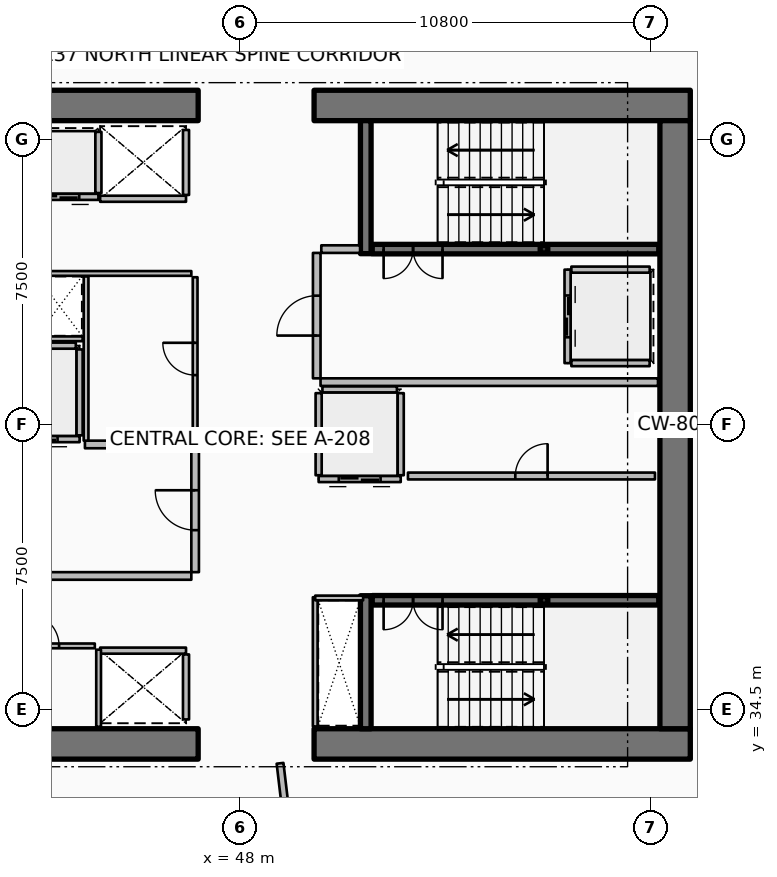
"""IFC4 building model, lengths in metres.
Left out: names, types, materials, properties, quantities, classifications, styles, units other than length and angle.
Written with IfcOpenShell. Run it as: python <this file> out.ifc"""

import sys

from ifc_helpers import new_model, si_unit, direction, frame, frame_2d, origin, origin_2d, place, context, subcontext, project, spatial, rectangle, hollow_rectangle, extrude, element, fill, save


model = new_model("IFC4")
c1 = context("Model", 3, precision=1e-05, world=origin(), true_north=direction((0.0, 1.0)))
c2 = subcontext(c1, "Body", "Model", "MODEL_VIEW")
j1 = project(units=[si_unit("LENGTHUNIT", "METRE"), si_unit("PLANEANGLEUNIT", "RADIAN")], contexts=[c1])
p1 = place(None, origin())
s1 = spatial("IfcSite", under=j1, at=p1, CompositionType="ELEMENT")
p2 = place(p1, origin())
s2 = spatial("IfcBuilding", under=s1, at=p2, CompositionType="ELEMENT")
p3 = place(p2, frame((0.0, 0.0, 150.3)))
s3 = spatial("IfcBuildingStorey", under=s2, at=p3, CompositionType="ELEMENT", Elevation=150.3)
p4 = place(p3, frame((37.0, 33.6, 0.0), z_axis=(0.0, 0.0, 1.0), x_axis=(1.0, 0.0, 0.0)))
e1 = element("IfcWall", 1, at=p4, inside=s3, PredefinedType="SHEAR", context=c2, shape_type="SweptSolid", body=[
    extrude(rectangle(XDim=9.9, YDim=0.8, at=frame_2d((4.95, 0.0))), origin(), (0.0, 0.0, 1.0), 3.75),
])
p5 = place(p3, frame((49.95, 33.6, 0.0), z_axis=(0.0, 0.0, 1.0), x_axis=(1.0, 0.0, 0.0)))
e2 = element("IfcWall", 2, at=p5, inside=s3, PredefinedType="SHEAR", context=c2, shape_type="SweptSolid", body=[
    extrude(rectangle(XDim=9.9, YDim=0.8, at=frame_2d((4.95, 0.0))), origin(), (0.0, 0.0, 1.0), 3.75),
])
p6 = place(p3, frame((37.0, 50.4, 0.0), z_axis=(0.0, 0.0, 1.0), x_axis=(1.0, 0.0, 0.0)))
e3 = element("IfcWall", 3, at=p6, inside=s3, PredefinedType="SHEAR", context=c2, shape_type="SweptSolid", body=[
    extrude(rectangle(XDim=9.9, YDim=0.8, at=frame_2d((4.95, 0.0))), origin(), (0.0, 0.0, 1.0), 3.75),
])
p7 = place(p3, frame((49.95, 50.4, 0.0), z_axis=(0.0, 0.0, 1.0), x_axis=(1.0, 0.0, 0.0)))
e4 = element("IfcWall", 4, at=p7, inside=s3, PredefinedType="SHEAR", context=c2, shape_type="SweptSolid", body=[
    extrude(rectangle(XDim=9.9, YDim=0.8, at=frame_2d((4.95, 0.0))), origin(), (0.0, 0.0, 1.0), 3.75),
])
p8 = place(p3, frame((59.45, 34.0, 0.0), z_axis=(0.0, 0.0, 1.0), x_axis=(0.0, 1.0, 0.0)))
e5 = element("IfcWall", 5, at=p8, inside=s3, PredefinedType="SHEAR", context=c2, shape_type="SweptSolid", body=[
    extrude(rectangle(XDim=16.0, YDim=0.8, at=frame_2d((8.0, 0.0))), origin(), (0.0, 0.0, 1.0), 3.75),
])
for number, where, z_axis, x_axis in (
    (6, (51.31, 46.5, 0.0), (0.0, 0.0, 1.0), (0.0, 1.0, 0.0)),
    (7, (51.31, 34.0, 0.0), (0.0, 0.0, 1.0), (0.0, 1.0, 0.0)),
):
    element("IfcWall", number, at=place(p3, frame(where, z_axis=z_axis, x_axis=x_axis)), inside=s3, PredefinedType="SHEAR", context=c2, shape_type="SweptSolid", body=[
        extrude(rectangle(XDim=3.5, YDim=0.28, at=frame_2d((1.75, 0.0))), origin(), (0.0, 0.0, 1.0), 3.75),
    ])
for number, where, z_axis, x_axis in (
    (8, (56.0, 46.62, 0.0), (0.0, 0.0, 1.0), (1.0, 0.0, 0.0)),
    (9, (56.0, 37.38, 0.0), (0.0, 0.0, 1.0), (1.0, 0.0, 0.0)),
):
    element("IfcColumn", number, at=place(p3, frame(where, z_axis=z_axis, x_axis=x_axis)), inside=s3, PredefinedType="COLUMN", context=c2, shape_type="SweptSolid", body=[
        extrude(hollow_rectangle(XDim=0.2, YDim=0.2, WallThickness=0.01, InnerFilletRadius=0.01, OuterFilletRadius=0.02, at=origin_2d()), origin(), (0.0, 0.0, 1.0), 1.67),
    ])
p9 = place(p3, frame((51.48, 46.62, 0.0), z_axis=(0.0, 0.0, 1.0), x_axis=(1.0, 0.0, 0.0)))
e10 = element("IfcWall", 10, at=p9, inside=s3, PredefinedType="SOLIDWALL", context=c2, shape_type="SweptSolid", body=[
    extrude(rectangle(XDim=7.54, YDim=0.25, at=frame_2d((3.77, 0.0))), origin(), (0.0, 0.0, 1.0), 3.5),
])
p10 = place(p9, frame((0.3, 0.0, 0.0)))
e11 = element("IfcOpeningElement", 11, at=p10, cuts=e10, PredefinedType="OPENING", context=c2, shape_type="SweptSolid", body=[
    extrude(rectangle(XDim=1.55, YDim=2.15, at=frame_2d((0.775, 1.075))), frame((0.0, 0.135, 0.0), z_axis=(0.0, -1.0, 0.0), x_axis=(1.0, 0.0, 0.0)), (0.0, 0.0, 1.0), 0.27),
])
p11 = place(p3, frame((51.48, 37.38, 0.0), z_axis=(0.0, 0.0, 1.0), x_axis=(1.0, 0.0, 0.0)))
e12 = element("IfcWall", 12, at=p11, inside=s3, PredefinedType="SOLIDWALL", context=c2, shape_type="SweptSolid", body=[
    extrude(rectangle(XDim=7.54, YDim=0.25, at=frame_2d((3.77, 0.0))), origin(), (0.0, 0.0, 1.0), 3.5),
])
p12 = place(p11, frame((0.3, 0.0, 0.0)))
e13 = element("IfcOpeningElement", 13, at=p12, cuts=e12, PredefinedType="OPENING", context=c2, shape_type="SweptSolid", body=[
    extrude(rectangle(XDim=1.55, YDim=2.15, at=frame_2d((0.775, 1.075))), frame((0.0, 0.135, 0.0), z_axis=(0.0, -1.0, 0.0), x_axis=(1.0, 0.0, 0.0)), (0.0, 0.0, 1.0), 0.27),
])
p13 = place(p3, frame((44.275, 47.995, 0.0), z_axis=(0.0, 0.0, 1.0), x_axis=(-1.0, 0.0, 0.0)))
e14 = element("IfcWall", 14, at=p13, inside=s3, PredefinedType="PARTITIONING", context=c2, shape_type="SweptSolid", body=[
    extrude(rectangle(XDim=2.11, YDim=0.16, at=frame_2d((1.055, 0.0))), origin(), (0.0, 0.0, 1.0), 3.5),
])
p14 = place(p13, frame((0.505, 0.0, 0.0)))
e15 = element("IfcOpeningElement", 15, at=p14, cuts=e14, PredefinedType="OPENING", context=c2, shape_type="SweptSolid", body=[
    extrude(rectangle(XDim=1.1, YDim=2.1, at=frame_2d((0.55, 1.05))), frame((0.0, 0.09, 0.0), z_axis=(0.0, -1.0, 0.0), x_axis=(1.0, 0.0, 0.0)), (0.0, 0.0, 1.0), 0.18),
])
p15 = place(p3, frame((44.275, 48.095, 0.0), z_axis=(0.0, 0.0, 1.0), x_axis=(0.0, 1.0, 0.0)))
e16 = element("IfcWall", 16, at=p15, inside=s3, PredefinedType="PARTITIONING", context=c2, shape_type="SweptSolid", body=[
    extrude(rectangle(XDim=1.61, YDim=0.16, at=frame_2d((0.805, 0.0))), origin(), (0.0, 0.0, 1.0), 3.5),
])
p16 = place(p3, frame((46.58, 47.945, 0.0), z_axis=(0.0, 0.0, 1.0), x_axis=(-1.0, 0.0, 0.0)))
e17 = element("IfcWall", 17, at=p16, inside=s3, PredefinedType="PARTITIONING", context=c2, shape_type="SweptSolid", body=[
    extrude(rectangle(XDim=2.26, YDim=0.16, at=frame_2d((1.13, 0.0))), origin(), (0.0, 0.0, 1.0), 3.5),
])
p17 = place(p3, frame((46.58, 48.045, 0.0), z_axis=(0.0, 0.0, 1.0), x_axis=(0.0, 1.0, 0.0)))
e18 = element("IfcWall", 18, at=p17, inside=s3, PredefinedType="PARTITIONING", context=c2, shape_type="SweptSolid", body=[
    extrude(rectangle(XDim=1.71, YDim=0.16, at=frame_2d((0.855, 0.0))), origin(), (0.0, 0.0, 1.0), 3.5),
])
p18 = place(p3, frame((44.32, 36.055, 0.0), z_axis=(0.0, 0.0, 1.0), x_axis=(1.0, 0.0, 0.0)))
e19 = element("IfcWall", 19, at=p18, inside=s3, PredefinedType="PARTITIONING", context=c2, shape_type="SweptSolid", body=[
    extrude(rectangle(XDim=2.26, YDim=0.16, at=frame_2d((1.13, 0.0))), origin(), (0.0, 0.0, 1.0), 3.5),
])
p19 = place(p3, frame((46.58, 34.245, 0.0), z_axis=(0.0, 0.0, 1.0), x_axis=(0.0, 1.0, 0.0)))
e20 = element("IfcWall", 20, at=p19, inside=s3, PredefinedType="PARTITIONING", context=c2, shape_type="SweptSolid", body=[
    extrude(rectangle(XDim=1.71, YDim=0.16, at=frame_2d((0.855, 0.0))), origin(), (0.0, 0.0, 1.0), 3.5),
])
p20 = place(p3, frame((43.78, 41.62, 0.0), z_axis=(0.0, 0.0, 1.0), x_axis=(-1.0, 0.0, 0.0)))
e21 = element("IfcWall", 21, at=p20, inside=s3, PredefinedType="PARTITIONING", context=c2, shape_type="SweptSolid", body=[
    extrude(rectangle(XDim=2.26, YDim=0.16, at=frame_2d((1.13, 0.0))), origin(), (0.0, 0.0, 1.0), 3.5),
])
p21 = place(p20, frame((0.58, 0.0, 0.0)))
e22 = element("IfcOpeningElement", 22, at=p21, cuts=e21, PredefinedType="OPENING", context=c2, shape_type="SweptSolid", body=[
    extrude(rectangle(XDim=1.1, YDim=2.1, at=frame_2d((0.55, 1.05))), frame((0.0, 0.09, 0.0), z_axis=(0.0, -1.0, 0.0), x_axis=(1.0, 0.0, 0.0)), (0.0, 0.0, 1.0), 0.18),
])
p22 = place(p3, frame((43.78, 41.72, 0.0), z_axis=(0.0, 0.0, 1.0), x_axis=(0.0, 1.0, 0.0)))
e23 = element("IfcWall", 23, at=p22, inside=s3, PredefinedType="PARTITIONING", context=c2, shape_type="SweptSolid", body=[
    extrude(rectangle(XDim=2.26, YDim=0.16, at=frame_2d((1.13, 0.0))), origin(), (0.0, 0.0, 1.0), 3.5),
])
p23 = place(p3, frame((41.62, 44.08, 0.0), z_axis=(0.0, 0.0, 1.0), x_axis=(1.0, 0.0, 0.0)))
e24 = element("IfcWall", 24, at=p23, inside=s3, PredefinedType="PARTITIONING", context=c2, shape_type="SweptSolid", body=[
    extrude(rectangle(XDim=2.06, YDim=0.16, at=frame_2d((1.03, 0.0))), origin(), (0.0, 0.0, 1.0), 3.5),
])
p24 = place(p3, frame((56.62, 46.08, 0.0), z_axis=(0.0, 0.0, 1.0), x_axis=(0.0, -1.0, 0.0)))
e25 = element("IfcWall", 25, at=p24, inside=s3, PredefinedType="PARTITIONING", context=c2, shape_type="SweptSolid", body=[
    extrude(rectangle(XDim=2.46, YDim=0.16, at=frame_2d((1.23, 0.0))), origin(), (0.0, 0.0, 1.0), 3.5),
])
p25 = place(p24, frame((0.68, 0.0, 0.0)))
e26 = element("IfcOpeningElement", 26, at=p25, cuts=e25, PredefinedType="OPENING", context=c2, shape_type="SweptSolid", body=[
    extrude(rectangle(XDim=1.1, YDim=2.1, at=frame_2d((0.55, 1.05))), frame((0.0, 0.09, 0.0), z_axis=(0.0, -1.0, 0.0), x_axis=(1.0, 0.0, 0.0)), (0.0, 0.0, 1.0), 0.18),
])
for number, where, z_axis, x_axis in (
    (27, (56.72, 46.08, 0.0), (0.0, 0.0, 1.0), (1.0, 0.0, 0.0)),
    (28, (56.72, 43.62, 0.0), (0.0, 0.0, 1.0), (1.0, 0.0, 0.0)),
):
    element("IfcWall", number, at=place(p3, frame(where, z_axis=z_axis, x_axis=x_axis)), inside=s3, PredefinedType="PARTITIONING", context=c2, shape_type="SweptSolid", body=[
        extrude(rectangle(XDim=2.06, YDim=0.16, at=frame_2d((1.03, 0.0))), origin(), (0.0, 0.0, 1.0), 3.5),
    ])
p26 = place(p3, frame((52.23, 40.57, 0.0), z_axis=(0.0, 0.0, 1.0), x_axis=(-1.0, 0.0, 0.0)))
e29 = element("IfcWall", 29, at=p26, inside=s3, PredefinedType="PARTITIONING", context=c2, shape_type="SweptSolid", body=[
    extrude(rectangle(XDim=2.16, YDim=0.16, at=frame_2d((1.08, 0.0))), origin(), (0.0, 0.0, 1.0), 3.5),
])
p27 = place(p26, frame((0.53, 0.0, 0.0)))
e30 = element("IfcOpeningElement", 30, at=p27, cuts=e29, PredefinedType="OPENING", context=c2, shape_type="SweptSolid", body=[
    extrude(rectangle(XDim=1.1, YDim=2.1, at=frame_2d((0.55, 1.05))), frame((0.0, 0.09, 0.0), z_axis=(0.0, -1.0, 0.0), x_axis=(1.0, 0.0, 0.0)), (0.0, 0.0, 1.0), 0.18),
])
for number, where, z_axis, x_axis in (
    (31, (52.23, 40.67, 0.0), (0.0, 0.0, 1.0), (0.0, 1.0, 0.0)),
    (32, (50.07, 40.67, 0.0), (0.0, 0.0, 1.0), (0.0, 1.0, 0.0)),
):
    element("IfcWall", number, at=place(p3, frame(where, z_axis=z_axis, x_axis=x_axis)), inside=s3, PredefinedType="PARTITIONING", context=c2, shape_type="SweptSolid", body=[
        extrude(rectangle(XDim=2.16, YDim=0.16, at=frame_2d((1.08, 0.0))), origin(), (0.0, 0.0, 1.0), 3.5),
    ])
p28 = place(p3, frame((50.17, 42.93, 0.0), z_axis=(0.0, 0.0, 1.0), x_axis=(1.0, 0.0, 0.0)))
e33 = element("IfcWall", 33, at=p28, inside=s3, PredefinedType="PARTITIONING", context=c2, shape_type="SweptSolid", body=[
    extrude(rectangle(XDim=1.96, YDim=0.16, at=frame_2d((0.98, 0.0))), origin(), (0.0, 0.0, 1.0), 3.5),
])
p29 = place(p3, frame((52.42, 40.65, 0.0), z_axis=(0.0, 0.0, 1.0), x_axis=(1.0, 0.0, 0.0)))
e34 = element("IfcWall", 34, at=p29, inside=s3, PredefinedType="PARTITIONING", context=c2, shape_type="SweptSolid", body=[
    extrude(rectangle(XDim=6.5, YDim=0.18, at=frame_2d((3.25, 0.0))), origin(), (0.0, 0.0, 1.0), 3.5),
])
p30 = place(p29, frame((2.825, 0.0, 0.0)))
e35 = element("IfcOpeningElement", 35, at=p30, cuts=e34, PredefinedType="OPENING", context=c2, shape_type="SweptSolid", body=[
    extrude(rectangle(XDim=0.85, YDim=2.06, at=frame_2d((0.425, 1.03))), frame((0.0, 0.1, 0.0), z_axis=(0.0, -1.0, 0.0), x_axis=(1.0, 0.0, 0.0)), (0.0, 0.0, 1.0), 0.2),
])
p31 = place(p3, frame((44.28, 34.05, 0.0), z_axis=(0.0, 0.0, 1.0), x_axis=(0.0, 1.0, 0.0)))
e36 = element("IfcWall", 36, at=p31, inside=s3, PredefinedType="PARTITIONING", context=c2, shape_type="SweptSolid", body=[
    extrude(rectangle(XDim=2.03, YDim=0.125, at=frame_2d((1.015, 0.0))), origin(), (0.0, 0.0, 1.0), 2.94),
])
p32 = place(p3, frame((41.45, 36.18, 0.0), z_axis=(0.0, 0.0, 1.0), x_axis=(1.0, 0.0, 0.0)))
e37 = element("IfcWall", 37, at=p32, inside=s3, PredefinedType="PARTITIONING", context=c2, shape_type="SweptSolid", body=[
    extrude(rectangle(XDim=2.73, YDim=0.125, at=frame_2d((1.365, 0.0))), origin(), (0.0, 0.0, 1.0), 2.94),
])
p33 = place(p32, frame((0.94, 0.0, 0.0)))
e38 = element("IfcOpeningElement", 38, at=p33, cuts=e37, PredefinedType="OPENING", context=c2, shape_type="SweptSolid", body=[
    extrude(rectangle(XDim=0.85, YDim=2.06, at=frame_2d((0.425, 1.03))), frame((0.0, 0.073, 0.0), z_axis=(0.0, -1.0, 0.0), x_axis=(1.0, 0.0, 0.0)), (0.0, 0.0, 1.0), 0.145),
])
p34 = place(p3, frame((41.35, 38.02, 0.0), z_axis=(0.0, 0.0, 1.0), x_axis=(1.0, 0.0, 0.0)))
e39 = element("IfcWall", 39, at=p34, inside=s3, PredefinedType="PARTITIONING", context=c2, shape_type="SweptSolid", body=[
    extrude(rectangle(XDim=5.37, YDim=0.2, at=frame_2d((2.685, 0.0))), origin(), (0.0, 0.0, 1.0), 3.5),
])
p35 = place(p3, frame((43.92, 41.48, 0.0), z_axis=(0.0, 0.0, 1.0), x_axis=(1.0, 0.0, 0.0)))
e40 = element("IfcWall", 40, at=p35, inside=s3, PredefinedType="PARTITIONING", context=c2, shape_type="SweptSolid", body=[
    extrude(rectangle(XDim=2.8, YDim=0.2, at=frame_2d((1.4, 0.0))), origin(), (0.0, 0.0, 1.0), 3.5),
])
p36 = place(p3, frame((46.82, 38.12, 0.0), z_axis=(0.0, 0.0, 1.0), x_axis=(0.0, 1.0, 0.0)))
e41 = element("IfcWall", 41, at=p36, inside=s3, PredefinedType="PARTITIONING", context=c2, shape_type="SweptSolid", body=[
    extrude(rectangle(XDim=3.26, YDim=0.2, at=frame_2d((1.63, 0.0))), origin(), (0.0, 0.0, 1.0), 3.5),
])
p37 = place(p36, frame((1.105, 0.0, 0.0)))
e42 = element("IfcOpeningElement", 42, at=p37, cuts=e41, PredefinedType="OPENING", context=c2, shape_type="SweptSolid", body=[
    extrude(rectangle(XDim=1.05, YDim=2.1, at=frame_2d((0.525, 1.05))), frame((0.0, 0.11, 0.0), z_axis=(0.0, -1.0, 0.0), x_axis=(1.0, 0.0, 0.0)), (0.0, 0.0, 1.0), 0.22),
])
p38 = place(p3, frame((50.12, 43.12, 0.0), z_axis=(0.0, 0.0, 1.0), x_axis=(1.0, 0.0, 0.0)))
e43 = element("IfcWall", 43, at=p38, inside=s3, PredefinedType="PARTITIONING", context=c2, shape_type="SweptSolid", body=[
    extrude(rectangle(XDim=8.88, YDim=0.2, at=frame_2d((4.44, 0.0))), origin(), (0.0, 0.0, 1.0), 3.5),
])
p39 = place(p3, frame((50.14, 46.62, 0.0), z_axis=(0.0, 0.0, 1.0), x_axis=(1.0, 0.0, 0.0)))
e44 = element("IfcWall", 44, at=p39, inside=s3, PredefinedType="PARTITIONING", context=c2, shape_type="SweptSolid", body=[
    extrude(rectangle(XDim=1.02, YDim=0.2, at=frame_2d((0.51, 0.0))), origin(), (0.0, 0.0, 1.0), 3.5),
])
p40 = place(p3, frame((50.02, 43.22, 0.0), z_axis=(0.0, 0.0, 1.0), x_axis=(0.0, 1.0, 0.0)))
e45 = element("IfcWall", 45, at=p40, inside=s3, PredefinedType="PARTITIONING", context=c2, shape_type="SweptSolid", body=[
    extrude(rectangle(XDim=3.3, YDim=0.2, at=frame_2d((1.65, 0.0))), origin(), (0.0, 0.0, 1.0), 3.5),
])
p41 = place(p40, frame((1.125, 0.0, 0.0)))
e46 = element("IfcOpeningElement", 46, at=p41, cuts=e45, PredefinedType="OPENING", context=c2, shape_type="SweptSolid", body=[
    extrude(rectangle(XDim=1.05, YDim=2.1, at=frame_2d((0.525, 1.05))), frame((0.0, 0.11, 0.0), z_axis=(0.0, -1.0, 0.0), x_axis=(1.0, 0.0, 0.0)), (0.0, 0.0, 1.0), 0.22),
])
p42 = place(p3, frame((41.36, 45.98, 0.0), z_axis=(0.0, 0.0, 1.0), x_axis=(1.0, 0.0, 0.0)))
e47 = element("IfcWall", 47, at=p42, inside=s3, PredefinedType="PARTITIONING", context=c2, shape_type="SweptSolid", body=[
    extrude(rectangle(XDim=5.36, YDim=0.125, at=frame_2d((2.68, 0.0))), origin(), (0.0, 0.0, 1.0), 2.94),
])
p43 = place(p3, frame((41.36, 44.26, 0.0), z_axis=(0.0, 0.0, 1.0), x_axis=(1.0, 0.0, 0.0)))
e48 = element("IfcWall", 48, at=p43, inside=s3, PredefinedType="PARTITIONING", context=c2, shape_type="SweptSolid", body=[
    extrude(rectangle(XDim=2.5, YDim=0.125, at=frame_2d((1.25, 0.0))), origin(), (0.0, 0.0, 1.0), 2.94),
])
p44 = place(p3, frame((49.98, 34.06, 0.0), z_axis=(0.0, 0.0, 1.0), x_axis=(0.0, 1.0, 0.0)))
e49 = element("IfcWall", 49, at=p44, inside=s3, PredefinedType="PARTITIONING", context=c2, shape_type="SweptSolid", body=[
    extrude(rectangle(XDim=3.4, YDim=0.125, at=frame_2d((1.7, 0.0))), origin(), (0.0, 0.0, 1.0), 2.94),
])
p45 = place(p3, frame((49.98, 37.44, 0.0), z_axis=(0.0, 0.0, 1.0), x_axis=(1.0, 0.0, 0.0)))
e50 = element("IfcWall", 50, at=p45, inside=s3, PredefinedType="PARTITIONING", context=c2, shape_type="SweptSolid", body=[
    extrude(rectangle(XDim=1.26, YDim=0.125, at=frame_2d((0.63, 0.0))), origin(), (0.0, 0.0, 1.0), 2.94),
])
p46 = place(p3, frame((43.95, 41.58, 0.0), z_axis=(0.0, 0.0, 1.0), x_axis=(0.0, 1.0, 0.0)))
e51 = element("IfcWall", 51, at=p46, inside=s3, PredefinedType="PARTITIONING", context=c2, shape_type="SweptSolid", body=[
    extrude(rectangle(XDim=4.32, YDim=0.125, at=frame_2d((2.16, 0.0))), origin(), (0.0, 0.0, 1.0), 2.94),
])
p47 = place(p3, frame((46.82, 41.58, 0.0), z_axis=(0.0, 0.0, 1.0), x_axis=(0.0, 1.0, 0.0)))
e52 = element("IfcWall", 52, at=p47, inside=s3, PredefinedType="PARTITIONING", context=c2, shape_type="SweptSolid", body=[
    extrude(rectangle(XDim=4.3, YDim=0.125, at=frame_2d((2.15, 0.0))), origin(), (0.0, 0.0, 1.0), 2.94),
])
p48 = place(p47, frame((1.725, 0.0, 0.0)))
e53 = element("IfcOpeningElement", 53, at=p48, cuts=e52, PredefinedType="OPENING", context=c2, shape_type="SweptSolid", body=[
    extrude(rectangle(XDim=0.85, YDim=2.06, at=frame_2d((0.425, 1.03))), frame((0.0, 0.073, 0.0), z_axis=(0.0, -1.0, 0.0), x_axis=(1.0, 0.0, 0.0)), (0.0, 0.0, 1.0), 0.145),
])
p49 = place(p3, frame((49.054, 33.091, 0.0), z_axis=(0.0, 0.0, 1.0), x_axis=(0.117543744731, -0.993067705685, 0.0)))
e54 = element("IfcWall", 54, at=p49, inside=s3, PredefinedType="PARTITIONING", context=c2, shape_type="SweptSolid", body=[
    extrude(rectangle(XDim=12.763, YDim=0.18, at=frame_2d((6.382, 0.0))), origin(), (0.0, 0.0, 1.0), 2.94),
])
p50 = place(p3, frame((64.017, 51.093, 0.0), z_axis=(0.0, 0.0, 1.0), x_axis=(-0.649447060425, 0.76040680935, 0.0)))
e55 = element("IfcWall", 55, at=p50, inside=s3, PredefinedType="PARTITIONING", context=c2, shape_type="SweptSolid", body=[
    extrude(rectangle(XDim=6.975, YDim=0.125, at=frame_2d((3.487, 0.0))), origin(), (0.0, 0.0, 1.0), 2.94),
])
p51 = place(p50, frame((3.037, 0.0, 0.0)))
e56 = element("IfcOpeningElement", 56, at=p51, cuts=e55, PredefinedType="OPENING", context=c2, shape_type="SweptSolid", body=[
    extrude(rectangle(XDim=0.9, YDim=2.08, at=frame_2d((0.45, 1.04))), frame((0.0, 0.073, 0.0), z_axis=(0.0, -1.0, 0.0), x_axis=(1.0, 0.0, 0.0)), (0.0, 0.0, 1.0), 0.145),
])
p52 = place(p10, origin())
e57 = element("IfcDoor", 57, at=p52, inside=s3, OperationType="DOUBLE_DOOR_SINGLE_SWING", PredefinedType="DOOR", context=c2, shape_type="SweptSolid", body=[
    extrude(rectangle(XDim=1.55, YDim=2.15, at=frame_2d((0.775, 1.075))), frame((0.0, 0.025, 0.0), z_axis=(0.0, -1.0, 0.0), x_axis=(1.0, 0.0, 0.0)), (0.0, 0.0, 1.0), 0.05),
])
fill(e11, e57)
p53 = place(p12, origin())
e58 = element("IfcDoor", 58, at=p53, inside=s3, OperationType="DOUBLE_DOOR_SINGLE_SWING", PredefinedType="DOOR", context=c2, shape_type="SweptSolid", body=[
    extrude(rectangle(XDim=1.55, YDim=2.15, at=frame_2d((0.775, 1.075))), frame((0.0, 0.025, 0.0), z_axis=(0.0, -1.0, 0.0), x_axis=(1.0, 0.0, 0.0)), (0.0, 0.0, 1.0), 0.05),
])
fill(e13, e58)
p54 = place(p14, origin())
e59 = element("IfcDoor", 59, at=p54, inside=s3, OperationType="DOUBLE_DOOR_SLIDING", PredefinedType="DOOR", context=c2, shape_type="SweptSolid", body=[
    extrude(rectangle(XDim=1.1, YDim=2.1, at=frame_2d((0.55, 1.05))), frame((0.0, 0.025, 0.0), z_axis=(0.0, -1.0, 0.0), x_axis=(1.0, 0.0, 0.0)), (0.0, 0.0, 1.0), 0.05),
])
fill(e15, e59)
p55 = place(p21, origin())
e60 = element("IfcDoor", 60, at=p55, inside=s3, OperationType="DOUBLE_DOOR_SLIDING", PredefinedType="DOOR", context=c2, shape_type="SweptSolid", body=[
    extrude(rectangle(XDim=1.1, YDim=2.1, at=frame_2d((0.55, 1.05))), frame((0.0, 0.025, 0.0), z_axis=(0.0, -1.0, 0.0), x_axis=(1.0, 0.0, 0.0)), (0.0, 0.0, 1.0), 0.05),
])
fill(e22, e60)
p56 = place(p25, origin())
e61 = element("IfcDoor", 61, at=p56, inside=s3, OperationType="DOUBLE_DOOR_SLIDING", PredefinedType="DOOR", context=c2, shape_type="SweptSolid", body=[
    extrude(rectangle(XDim=1.1, YDim=2.1, at=frame_2d((0.55, 1.05))), frame((0.0, 0.025, 0.0), z_axis=(0.0, -1.0, 0.0), x_axis=(1.0, 0.0, 0.0)), (0.0, 0.0, 1.0), 0.05),
])
fill(e26, e61)
p57 = place(p27, origin())
e62 = element("IfcDoor", 62, at=p57, inside=s3, OperationType="DOUBLE_DOOR_SLIDING", PredefinedType="DOOR", context=c2, shape_type="SweptSolid", body=[
    extrude(rectangle(XDim=1.1, YDim=2.1, at=frame_2d((0.55, 1.05))), frame((0.0, 0.025, 0.0), z_axis=(0.0, -1.0, 0.0), x_axis=(1.0, 0.0, 0.0)), (0.0, 0.0, 1.0), 0.05),
])
fill(e30, e62)
p58 = place(p30, origin())
e63 = element("IfcDoor", 63, at=p58, inside=s3, OperationType="SINGLE_SWING_RIGHT", PredefinedType="DOOR", context=c2, shape_type="SweptSolid", body=[
    extrude(rectangle(XDim=0.85, YDim=2.06, at=frame_2d((0.425, 1.03))), frame((0.0, 0.025, 0.0), z_axis=(0.0, -1.0, 0.0), x_axis=(1.0, 0.0, 0.0)), (0.0, 0.0, 1.0), 0.05),
])
fill(e35, e63)
p59 = place(p33, origin())
e64 = element("IfcDoor", 64, at=p59, inside=s3, OperationType="SINGLE_SWING_LEFT", PredefinedType="DOOR", context=c2, shape_type="SweptSolid", body=[
    extrude(rectangle(XDim=0.85, YDim=2.06, at=frame_2d((0.425, 1.03))), frame((0.0, 0.025, 0.0), z_axis=(0.0, -1.0, 0.0), x_axis=(1.0, 0.0, 0.0)), (0.0, 0.0, 1.0), 0.05),
])
fill(e38, e64)
p60 = place(p37, origin())
e65 = element("IfcDoor", 65, at=p60, inside=s3, OperationType="SINGLE_SWING_RIGHT", PredefinedType="DOOR", context=c2, shape_type="SweptSolid", body=[
    extrude(rectangle(XDim=1.05, YDim=2.1, at=frame_2d((0.525, 1.05))), frame((0.0, 0.025, 0.0), z_axis=(0.0, -1.0, 0.0), x_axis=(1.0, 0.0, 0.0)), (0.0, 0.0, 1.0), 0.05),
])
fill(e42, e65)
p61 = place(p41, origin())
e66 = element("IfcDoor", 66, at=p61, inside=s3, OperationType="SINGLE_SWING_LEFT", PredefinedType="DOOR", context=c2, shape_type="SweptSolid", body=[
    extrude(rectangle(XDim=1.05, YDim=2.1, at=frame_2d((0.525, 1.05))), frame((0.0, 0.025, 0.0), z_axis=(0.0, -1.0, 0.0), x_axis=(1.0, 0.0, 0.0)), (0.0, 0.0, 1.0), 0.05),
])
fill(e46, e66)
p62 = place(p48, origin())
e67 = element("IfcDoor", 67, at=p62, inside=s3, OperationType="SINGLE_SWING_RIGHT", PredefinedType="DOOR", context=c2, shape_type="SweptSolid", body=[
    extrude(rectangle(XDim=0.85, YDim=2.06, at=frame_2d((0.425, 1.03))), frame((0.0, 0.025, 0.0), z_axis=(0.0, -1.0, 0.0), x_axis=(1.0, 0.0, 0.0)), (0.0, 0.0, 1.0), 0.05),
])
fill(e53, e67)
save(model, sys.argv[1])
